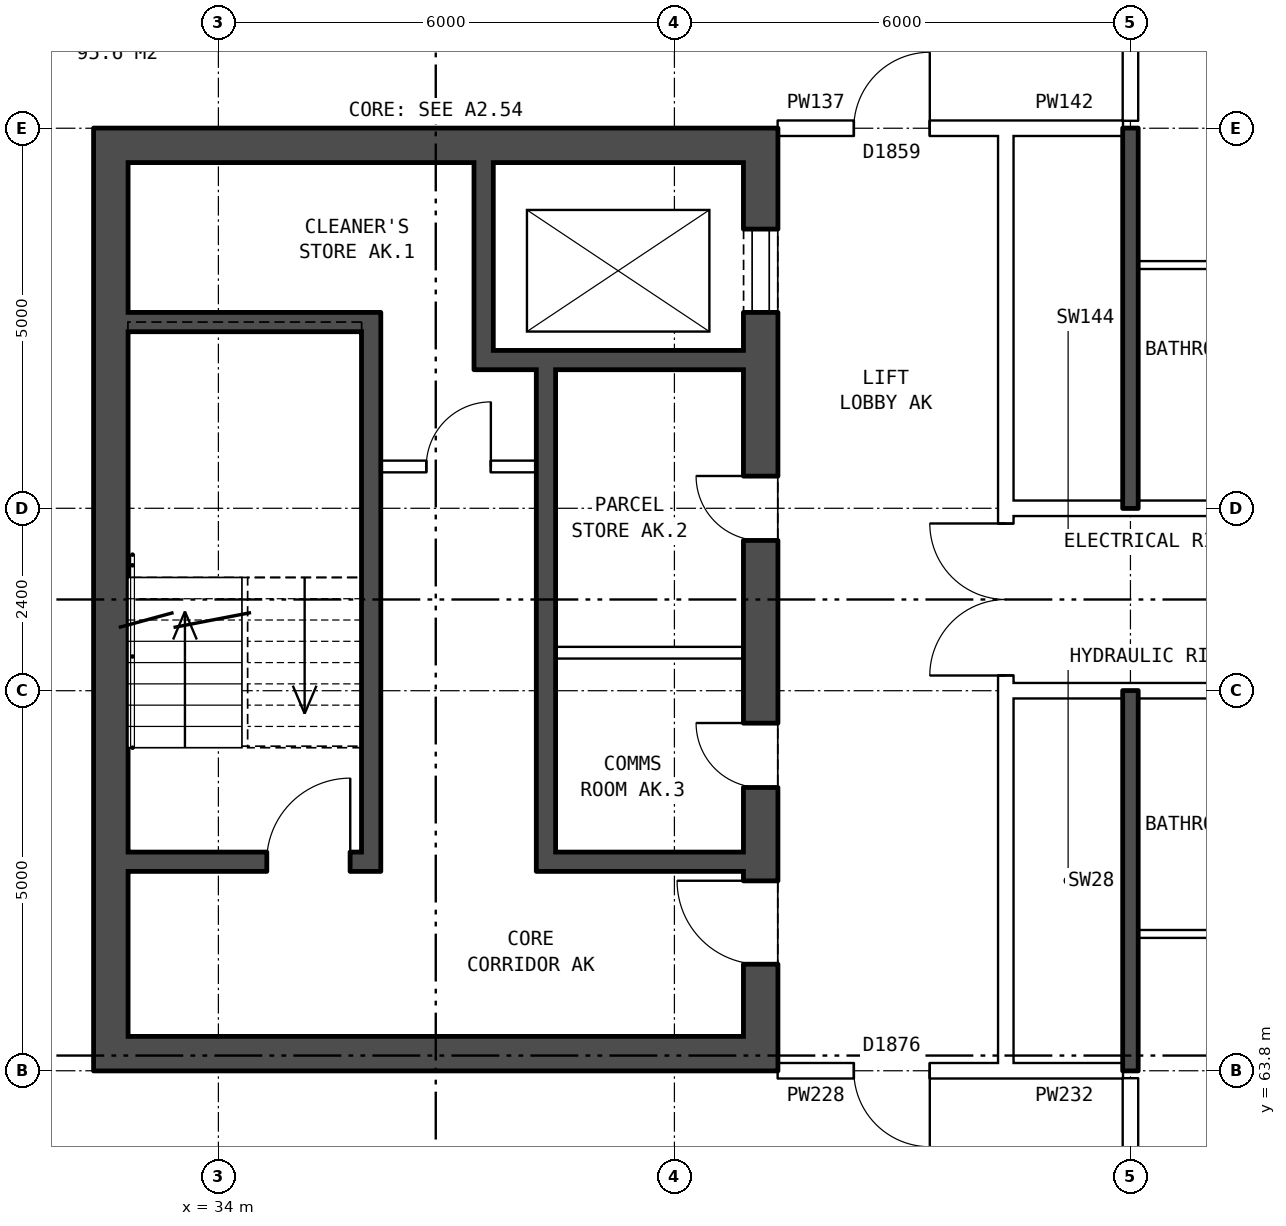
"""IFC4 building model, lengths in metres.
Left out: names, types, materials, properties, quantities, classifications, styles, units other than length and angle.
Written with IfcOpenShell. Run it as: python <this file> out.ifc"""

import sys

from ifc_helpers import new_model, si_unit, direction, frame, frame_2d, origin, place, context, subcontext, project, spatial, rectangle, extrude, element, fill, save


model = new_model("IFC4")
c1 = context("Model", 3, precision=1e-05, world=origin(), true_north=direction((0.0, 1.0)))
c2 = subcontext(c1, "Body", "Model", "MODEL_VIEW")
j1 = project(units=[si_unit("LENGTHUNIT", "METRE"), si_unit("PLANEANGLEUNIT", "RADIAN")], contexts=[c1])
p1 = place(None, origin())
s1 = spatial("IfcSite", under=j1, at=p1, CompositionType="ELEMENT")
p2 = place(p1, origin())
s2 = spatial("IfcBuilding", under=s1, at=p2, CompositionType="ELEMENT")
p3 = place(p2, frame((0.0, 0.0, 188.2)))
s3 = spatial("IfcBuildingStorey", under=s2, at=p3, CompositionType="ELEMENT", Elevation=188.2)
p4 = place(p3, frame((41.135, 76.2, 0.0), z_axis=(0.0, 0.0, 1.0), x_axis=(0.0, -1.0, 0.0)))
e1 = element("IfcWall", 1, at=p4, inside=s3, PredefinedType="SHEAR", context=c2, shape_type="SweptSolid", body=[
    extrude(rectangle(XDim=12.4, YDim=0.45, at=frame_2d((6.2, 0.0))), origin(), (0.0, 0.0, 1.0), 2.85),
])
p5 = place(p4, frame((1.325, 0.0, 0.0)))
e2 = element("IfcOpeningElement", 2, at=p5, cuts=e1, PredefinedType="OPENING", context=c2, shape_type="SweptSolid", body=[
    extrude(rectangle(XDim=1.1, YDim=2.1, at=frame_2d((0.55, 1.05))), frame((0.0, 0.235, 0.0), z_axis=(0.0, -1.0, 0.0), x_axis=(1.0, 0.0, 0.0)), (0.0, 0.0, 1.0), 0.47),
])
p6 = place(p4, frame((4.575, 0.0, 0.0)))
e3 = element("IfcOpeningElement", 3, at=p6, cuts=e1, PredefinedType="OPENING", context=c2, shape_type="SweptSolid", body=[
    extrude(rectangle(XDim=0.85, YDim=2.1, at=frame_2d((0.425, 1.05))), frame((0.0, 0.235, 0.0), z_axis=(0.0, -1.0, 0.0), x_axis=(1.0, 0.0, 0.0)), (0.0, 0.0, 1.0), 0.47),
])
p7 = place(p4, frame((7.825, 0.0, 0.0)))
e4 = element("IfcOpeningElement", 4, at=p7, cuts=e1, PredefinedType="OPENING", context=c2, shape_type="SweptSolid", body=[
    extrude(rectangle(XDim=0.85, YDim=2.1, at=frame_2d((0.425, 1.05))), frame((0.0, 0.235, 0.0), z_axis=(0.0, -1.0, 0.0), x_axis=(1.0, 0.0, 0.0)), (0.0, 0.0, 1.0), 0.47),
])
p8 = place(p4, frame((9.9, 0.0, 0.0)))
e5 = element("IfcOpeningElement", 5, at=p8, cuts=e1, PredefinedType="OPENING", context=c2, shape_type="SweptSolid", body=[
    extrude(rectangle(XDim=1.1, YDim=2.1, at=frame_2d((0.55, 1.05))), frame((0.0, 0.235, 0.0), z_axis=(0.0, -1.0, 0.0), x_axis=(1.0, 0.0, 0.0)), (0.0, 0.0, 1.0), 0.47),
])
p9 = place(p3, frame((32.585, 76.2, 0.0), z_axis=(0.0, 0.0, 1.0), x_axis=(0.0, -1.0, 0.0)))
e6 = element("IfcWall", 6, at=p9, inside=s3, PredefinedType="SHEAR", context=c2, shape_type="SweptSolid", body=[
    extrude(rectangle(XDim=12.4, YDim=0.45, at=frame_2d((6.2, 0.0))), origin(), (0.0, 0.0, 1.0), 2.85),
])
for number, where, z_axis, x_axis in (
    (7, (40.91, 75.975, 0.0), (0.0, 0.0, 1.0), (-1.0, 0.0, 0.0)),
    (8, (40.91, 64.025, 0.0), (0.0, 0.0, 1.0), (-1.0, 0.0, 0.0)),
):
    element("IfcWall", number, at=place(p3, frame(where, z_axis=z_axis, x_axis=x_axis)), inside=s3, PredefinedType="SHEAR", context=c2, shape_type="SweptSolid", body=[
        extrude(rectangle(XDim=8.1, YDim=0.45, at=frame_2d((4.05, 0.0))), origin(), (0.0, 0.0, 1.0), 2.85),
    ])
p10 = place(p3, frame((35.885, 73.65, 0.0), z_axis=(0.0, 0.0, 1.0), x_axis=(-1.0, 0.0, 0.0)))
e9 = element("IfcWall", 9, at=p10, inside=s3, PredefinedType="SHEAR", context=c2, shape_type="SweptSolid", body=[
    extrude(rectangle(XDim=3.075, YDim=0.25, at=frame_2d((1.538, 0.0))), origin(), (0.0, 0.0, 1.0), 2.85),
])
p11 = place(p3, frame((40.91, 73.15, 0.0), z_axis=(0.0, 0.0, 1.0), x_axis=(-1.0, 0.0, 0.0)))
e10 = element("IfcWall", 10, at=p11, inside=s3, PredefinedType="SHEAR", context=c2, shape_type="SweptSolid", body=[
    extrude(rectangle(XDim=3.545, YDim=0.25, at=frame_2d((1.772, 0.0))), origin(), (0.0, 0.0, 1.0), 2.85),
])
p12 = place(p3, frame((38.185, 71.75, 0.0), z_axis=(0.0, 0.0, 1.0), x_axis=(-1.0, 0.0, 0.0)))
e11 = element("IfcWall", 11, at=p12, inside=s3, PredefinedType="PARTITIONING", context=c2, shape_type="SweptSolid", body=[
    extrude(rectangle(XDim=2.05, YDim=0.15, at=frame_2d((1.025, 0.0))), origin(), (0.0, 0.0, 1.0), 2.85),
])
p13 = place(p12, frame((0.6, 0.0, 0.0)))
e12 = element("IfcOpeningElement", 12, at=p13, cuts=e11, PredefinedType="OPENING", context=c2, shape_type="SweptSolid", body=[
    extrude(rectangle(XDim=0.85, YDim=2.1, at=frame_2d((0.425, 1.05))), frame((0.0, 0.085, 0.0), z_axis=(0.0, -1.0, 0.0), x_axis=(1.0, 0.0, 0.0)), (0.0, 0.0, 1.0), 0.17),
])
p14 = place(p3, frame((40.91, 69.3, 0.0), z_axis=(0.0, 0.0, 1.0), x_axis=(-1.0, 0.0, 0.0)))
e13 = element("IfcWall", 13, at=p14, inside=s3, PredefinedType="PARTITIONING", context=c2, shape_type="SweptSolid", body=[
    extrude(rectangle(XDim=2.475, YDim=0.15, at=frame_2d((1.237, 0.0))), origin(), (0.0, 0.0, 1.0), 2.85),
])
p15 = place(p3, frame((40.91, 66.55, 0.0), z_axis=(0.0, 0.0, 1.0), x_axis=(-1.0, 0.0, 0.0)))
e14 = element("IfcWall", 14, at=p15, inside=s3, PredefinedType="SHEAR", context=c2, shape_type="SweptSolid", body=[
    extrude(rectangle(XDim=2.475, YDim=0.25, at=frame_2d((1.237, 0.0))), origin(), (0.0, 0.0, 1.0), 2.85),
])
p16 = place(p3, frame((35.885, 66.55, 0.0), z_axis=(0.0, 0.0, 1.0), x_axis=(-1.0, 0.0, 0.0)))
e15 = element("IfcWall", 15, at=p16, inside=s3, PredefinedType="SHEAR", context=c2, shape_type="SweptSolid", body=[
    extrude(rectangle(XDim=3.075, YDim=0.25, at=frame_2d((1.538, 0.0))), origin(), (0.0, 0.0, 1.0), 2.85),
])
p17 = place(p16, frame((0.15, 0.0, 0.0)))
e16 = element("IfcOpeningElement", 16, at=p17, cuts=e15, PredefinedType="OPENING", context=c2, shape_type="SweptSolid", body=[
    extrude(rectangle(XDim=1.1, YDim=2.1, at=frame_2d((0.55, 1.05))), frame((0.0, 0.135, 0.0), z_axis=(0.0, -1.0, 0.0), x_axis=(1.0, 0.0, 0.0)), (0.0, 0.0, 1.0), 0.27),
])
p18 = place(p3, frame((38.31, 73.025, 0.0), z_axis=(0.0, 0.0, 1.0), x_axis=(0.0, -1.0, 0.0)))
e17 = element("IfcWall", 17, at=p18, inside=s3, PredefinedType="SHEAR", context=c2, shape_type="SweptSolid", body=[
    extrude(rectangle(XDim=6.6, YDim=0.25, at=frame_2d((3.3, 0.0))), origin(), (0.0, 0.0, 1.0), 2.85),
])
p19 = place(p3, frame((37.49, 75.75, 0.0), z_axis=(0.0, 0.0, 1.0), x_axis=(0.0, -1.0, 0.0)))
e18 = element("IfcWall", 18, at=p19, inside=s3, PredefinedType="SHEAR", context=c2, shape_type="SweptSolid", body=[
    extrude(rectangle(XDim=2.475, YDim=0.25, at=frame_2d((1.238, 0.0))), origin(), (0.0, 0.0, 1.0), 2.85),
])
p20 = place(p3, frame((36.01, 73.775, 0.0), z_axis=(0.0, 0.0, 1.0), x_axis=(0.0, -1.0, 0.0)))
e19 = element("IfcWall", 19, at=p20, inside=s3, PredefinedType="SHEAR", context=c2, shape_type="SweptSolid", body=[
    extrude(rectangle(XDim=7.35, YDim=0.25, at=frame_2d((3.675, 0.0))), origin(), (0.0, 0.0, 1.0), 2.85),
])
p21 = place(p3, frame((44.36, 63.9, 0.0), z_axis=(0.0, 0.0, 1.0), x_axis=(0.0, 1.0, 0.0)))
e20 = element("IfcWall", 20, at=p21, inside=s3, PredefinedType="PARTITIONING", context=c2, shape_type="SweptSolid", body=[
    extrude(rectangle(XDim=12.2, YDim=0.2, at=frame_2d((6.1, 0.0))), origin(), (0.0, 0.0, 1.0), 2.85),
])
p22 = place(p21, frame((5.1, 0.0, 0.0)))
e21 = element("IfcOpeningElement", 21, at=p22, cuts=e20, PredefinedType="OPENING", context=c2, shape_type="SweptSolid", body=[
    extrude(rectangle(XDim=2.0, YDim=2.1, at=frame_2d((1.0, 1.05))), frame((0.0, 0.11, 0.0), z_axis=(0.0, -1.0, 0.0), x_axis=(1.0, 0.0, 0.0)), (0.0, 0.0, 1.0), 0.22),
])
p23 = place(p3, frame((41.36, 63.8, 0.0), z_axis=(0.0, 0.0, 1.0), x_axis=(1.0, 0.0, 0.0)))
e22 = element("IfcWall", 22, at=p23, inside=s3, PredefinedType="PARTITIONING", context=c2, shape_type="SweptSolid", body=[
    extrude(rectangle(XDim=3.0, YDim=0.2, at=frame_2d((1.5, 0.0))), origin(), (0.0, 0.0, 1.0), 2.85),
])
p24 = place(p23, frame((1.0, 0.0, 0.0)))
e23 = element("IfcOpeningElement", 23, at=p24, cuts=e22, PredefinedType="OPENING", context=c2, shape_type="SweptSolid", body=[
    extrude(rectangle(XDim=1.0, YDim=2.1, at=frame_2d((0.5, 1.05))), frame((0.0, 0.11, 0.0), z_axis=(0.0, -1.0, 0.0), x_axis=(1.0, 0.0, 0.0)), (0.0, 0.0, 1.0), 0.22),
])
p25 = place(p3, frame((44.36, 63.8, 0.0), z_axis=(0.0, 0.0, 1.0), x_axis=(1.0, 0.0, 0.0)))
e24 = element("IfcWall", 24, at=p25, inside=s3, PredefinedType="PARTITIONING", context=c2, shape_type="SweptSolid", body=[
    extrude(rectangle(XDim=1.54, YDim=0.2, at=frame_2d((0.77, 0.0))), origin(), (0.0, 0.0, 1.0), 2.85),
])
p26 = place(p3, frame((46.1, 65.6, 0.0), z_axis=(0.0, 0.0, 1.0), x_axis=(1.0, 0.0, 0.0)))
e25 = element("IfcWall", 25, at=p26, inside=s3, PredefinedType="PARTITIONING", context=c2, shape_type="SweptSolid", body=[
    extrude(rectangle(XDim=2.9, YDim=0.1, at=frame_2d((1.45, 0.0))), origin(), (0.0, 0.0, 1.0), 2.85),
])
p27 = place(p3, frame((44.36, 68.8, 0.0), z_axis=(0.0, 0.0, 1.0), x_axis=(1.0, 0.0, 0.0)))
e26 = element("IfcWall", 26, at=p27, inside=s3, PredefinedType="PARTITIONING", context=c2, shape_type="SweptSolid", body=[
    extrude(rectangle(XDim=19.28, YDim=0.2, at=frame_2d((9.64, 0.0))), origin(), (0.0, 0.0, 1.0), 2.85),
])
p28 = place(p27, frame((14.64, 0.0, 0.0)))
e27 = element("IfcOpeningElement", 27, at=p28, cuts=e26, PredefinedType="OPENING", context=c2, shape_type="SweptSolid", body=[
    extrude(rectangle(XDim=1.0, YDim=2.1, at=frame_2d((0.5, 1.05))), frame((0.0, 0.11, 0.0), z_axis=(0.0, -1.0, 0.0), x_axis=(1.0, 0.0, 0.0)), (0.0, 0.0, 1.0), 0.22),
])
p29 = place(p27, frame((5.64, 0.0, 0.0)))
e28 = element("IfcOpeningElement", 28, at=p29, cuts=e26, PredefinedType="OPENING", context=c2, shape_type="SweptSolid", body=[
    extrude(rectangle(XDim=1.0, YDim=2.1, at=frame_2d((0.5, 1.05))), frame((0.0, 0.11, 0.0), z_axis=(0.0, -1.0, 0.0), x_axis=(1.0, 0.0, 0.0)), (0.0, 0.0, 1.0), 0.22),
])
p30 = place(p3, frame((44.36, 71.2, 0.0), z_axis=(0.0, 0.0, 1.0), x_axis=(1.0, 0.0, 0.0)))
e29 = element("IfcWall", 29, at=p30, inside=s3, PredefinedType="PARTITIONING", context=c2, shape_type="SweptSolid", body=[
    extrude(rectangle(XDim=19.28, YDim=0.2, at=frame_2d((9.64, 0.0))), origin(), (0.0, 0.0, 1.0), 2.85),
])
p31 = place(p30, frame((14.64, 0.0, 0.0)))
e30 = element("IfcOpeningElement", 30, at=p31, cuts=e29, PredefinedType="OPENING", context=c2, shape_type="SweptSolid", body=[
    extrude(rectangle(XDim=1.0, YDim=2.1, at=frame_2d((0.5, 1.05))), frame((0.0, 0.11, 0.0), z_axis=(0.0, -1.0, 0.0), x_axis=(1.0, 0.0, 0.0)), (0.0, 0.0, 1.0), 0.22),
])
p32 = place(p30, frame((5.64, 0.0, 0.0)))
e31 = element("IfcOpeningElement", 31, at=p32, cuts=e29, PredefinedType="OPENING", context=c2, shape_type="SweptSolid", body=[
    extrude(rectangle(XDim=1.0, YDim=2.1, at=frame_2d((0.5, 1.05))), frame((0.0, 0.11, 0.0), z_axis=(0.0, -1.0, 0.0), x_axis=(1.0, 0.0, 0.0)), (0.0, 0.0, 1.0), 0.22),
])
p33 = place(p3, frame((46.1, 74.4, 0.0), z_axis=(0.0, 0.0, 1.0), x_axis=(1.0, 0.0, 0.0)))
e32 = element("IfcWall", 32, at=p33, inside=s3, PredefinedType="PARTITIONING", context=c2, shape_type="SweptSolid", body=[
    extrude(rectangle(XDim=2.9, YDim=0.1, at=frame_2d((1.45, 0.0))), origin(), (0.0, 0.0, 1.0), 2.85),
])
p34 = place(p3, frame((41.36, 76.2, 0.0), z_axis=(0.0, 0.0, 1.0), x_axis=(1.0, 0.0, 0.0)))
e33 = element("IfcWall", 33, at=p34, inside=s3, PredefinedType="PARTITIONING", context=c2, shape_type="SweptSolid", body=[
    extrude(rectangle(XDim=3.0, YDim=0.2, at=frame_2d((1.5, 0.0))), origin(), (0.0, 0.0, 1.0), 2.85),
])
p35 = place(p34, frame((1.0, 0.0, 0.0)))
e34 = element("IfcOpeningElement", 34, at=p35, cuts=e33, PredefinedType="OPENING", context=c2, shape_type="SweptSolid", body=[
    extrude(rectangle(XDim=1.0, YDim=2.1, at=frame_2d((0.5, 1.05))), frame((0.0, 0.11, 0.0), z_axis=(0.0, -1.0, 0.0), x_axis=(1.0, 0.0, 0.0)), (0.0, 0.0, 1.0), 0.22),
])
p36 = place(p3, frame((44.36, 76.2, 0.0), z_axis=(0.0, 0.0, 1.0), x_axis=(1.0, 0.0, 0.0)))
e35 = element("IfcWall", 35, at=p36, inside=s3, PredefinedType="PARTITIONING", context=c2, shape_type="SweptSolid", body=[
    extrude(rectangle(XDim=1.54, YDim=0.2, at=frame_2d((0.77, 0.0))), origin(), (0.0, 0.0, 1.0), 2.85),
])
p37 = place(p3, frame((46.0, 61.5, 0.0), z_axis=(0.0, 0.0, 1.0), x_axis=(0.0, 1.0, 0.0)))
e36 = element("IfcWall", 36, at=p37, inside=s3, PredefinedType="PARTITIONING", context=c2, shape_type="SweptSolid", body=[
    extrude(rectangle(XDim=2.2, YDim=0.2, at=frame_2d((1.1, 0.0))), origin(), (0.0, 0.0, 1.0), 2.85),
])
for number, where, z_axis, x_axis in (
    (37, (46.0, 63.8, 0.0), (0.0, 0.0, 1.0), (0.0, 1.0, 0.0)),
    (38, (46.0, 71.2, 0.0), (0.0, 0.0, 1.0), (0.0, 1.0, 0.0)),
):
    element("IfcWall", number, at=place(p3, frame(where, z_axis=z_axis, x_axis=x_axis)), inside=s3, PredefinedType="SOLIDWALL", context=c2, shape_type="SweptSolid", body=[
        extrude(rectangle(XDim=5.0, YDim=0.2, at=frame_2d((2.5, 0.0))), origin(), (0.0, 0.0, 1.0), 2.85),
    ])
p38 = place(p3, frame((46.0, 76.3, 0.0), z_axis=(0.0, 0.0, 1.0), x_axis=(0.0, 1.0, 0.0)))
e39 = element("IfcWall", 39, at=p38, inside=s3, PredefinedType="PARTITIONING", context=c2, shape_type="SweptSolid", body=[
    extrude(rectangle(XDim=2.2, YDim=0.2, at=frame_2d((1.1, 0.0))), origin(), (0.0, 0.0, 1.0), 2.85),
])
p39 = place(p5, origin())
e40 = element("IfcDoor", 40, at=p39, inside=s3, OperationType="DOUBLE_DOOR_SLIDING", PredefinedType="DOOR", context=c2, shape_type="SweptSolid", body=[
    extrude(rectangle(XDim=1.1, YDim=2.1, at=frame_2d((0.55, 1.05))), frame((0.0, -0.16, 0.0), z_axis=(0.0, -1.0, 0.0), x_axis=(1.0, 0.0, 0.0)), (0.0, 0.0, 1.0), 0.05),
])
fill(e2, e40)
p40 = place(p6, frame((0.85, 0.0, 0.0), z_axis=(0.0, 0.0, 1.0), x_axis=(-1.0, 0.0, 0.0)))
e41 = element("IfcDoor", 41, at=p40, inside=s3, OperationType="SINGLE_SWING_RIGHT", PredefinedType="DOOR", context=c2, shape_type="SweptSolid", body=[
    extrude(rectangle(XDim=0.85, YDim=2.1, at=frame_2d((0.425, 1.05))), frame((0.0, 0.21, 0.0), z_axis=(0.0, -1.0, 0.0), x_axis=(1.0, 0.0, 0.0)), (0.0, 0.0, 1.0), 0.05),
])
fill(e3, e41)
p41 = place(p7, frame((0.85, 0.0, 0.0), z_axis=(0.0, 0.0, 1.0), x_axis=(-1.0, 0.0, 0.0)))
e42 = element("IfcDoor", 42, at=p41, inside=s3, OperationType="SINGLE_SWING_RIGHT", PredefinedType="DOOR", context=c2, shape_type="SweptSolid", body=[
    extrude(rectangle(XDim=0.85, YDim=2.1, at=frame_2d((0.425, 1.05))), frame((0.0, 0.21, 0.0), z_axis=(0.0, -1.0, 0.0), x_axis=(1.0, 0.0, 0.0)), (0.0, 0.0, 1.0), 0.05),
])
fill(e4, e42)
p42 = place(p8, frame((1.1, 0.0, 0.0), z_axis=(0.0, 0.0, 1.0), x_axis=(-1.0, 0.0, 0.0)))
e43 = element("IfcDoor", 43, at=p42, inside=s3, OperationType="SINGLE_SWING_RIGHT", PredefinedType="DOOR", context=c2, shape_type="SweptSolid", body=[
    extrude(rectangle(XDim=1.1, YDim=2.1, at=frame_2d((0.55, 1.05))), frame((0.0, 0.21, 0.0), z_axis=(0.0, -1.0, 0.0), x_axis=(1.0, 0.0, 0.0)), (0.0, 0.0, 1.0), 0.05),
])
fill(e5, e43)
p43 = place(p17, frame((1.1, 0.0, 0.0), z_axis=(0.0, 0.0, 1.0), x_axis=(-1.0, 0.0, 0.0)))
e44 = element("IfcDoor", 44, at=p43, inside=s3, OperationType="SINGLE_SWING_RIGHT", PredefinedType="DOOR", context=c2, shape_type="SweptSolid", body=[
    extrude(rectangle(XDim=1.1, YDim=2.1, at=frame_2d((0.55, 1.05))), frame((0.0, 0.025, 0.0), z_axis=(0.0, -1.0, 0.0), x_axis=(1.0, 0.0, 0.0)), (0.0, 0.0, 1.0), 0.05),
])
fill(e16, e44)
p44 = place(p13, frame((0.85, 0.0, 0.0), z_axis=(0.0, 0.0, 1.0), x_axis=(-1.0, 0.0, 0.0)))
e45 = element("IfcDoor", 45, at=p44, inside=s3, OperationType="SINGLE_SWING_RIGHT", PredefinedType="DOOR", context=c2, shape_type="SweptSolid", body=[
    extrude(rectangle(XDim=0.85, YDim=2.1, at=frame_2d((0.425, 1.05))), frame((0.0, 0.025, 0.0), z_axis=(0.0, -1.0, 0.0), x_axis=(1.0, 0.0, 0.0)), (0.0, 0.0, 1.0), 0.05),
])
fill(e12, e45)
p45 = place(p22, origin())
e46 = element("IfcDoor", 46, at=p45, inside=s3, OperationType="DOUBLE_DOOR_SINGLE_SWING", PredefinedType="DOOR", context=c2, shape_type="SweptSolid", body=[
    extrude(rectangle(XDim=2.0, YDim=2.1, at=frame_2d((1.0, 1.05))), frame((0.0, 0.025, 0.0), z_axis=(0.0, -1.0, 0.0), x_axis=(1.0, 0.0, 0.0)), (0.0, 0.0, 1.0), 0.05),
])
fill(e21, e46)
p46 = place(p24, frame((1.0, 0.0, 0.0), z_axis=(0.0, 0.0, 1.0), x_axis=(-1.0, 0.0, 0.0)))
e47 = element("IfcDoor", 47, at=p46, inside=s3, OperationType="SINGLE_SWING_LEFT", PredefinedType="DOOR", context=c2, shape_type="SweptSolid", body=[
    extrude(rectangle(XDim=1.0, YDim=2.1, at=frame_2d((0.5, 1.05))), frame((0.0, 0.025, 0.0), z_axis=(0.0, -1.0, 0.0), x_axis=(1.0, 0.0, 0.0)), (0.0, 0.0, 1.0), 0.05),
])
fill(e23, e47)
p47 = place(p35, origin())
e48 = element("IfcDoor", 48, at=p47, inside=s3, OperationType="SINGLE_SWING_RIGHT", PredefinedType="DOOR", context=c2, shape_type="SweptSolid", body=[
    extrude(rectangle(XDim=1.0, YDim=2.1, at=frame_2d((0.5, 1.05))), frame((0.0, 0.025, 0.0), z_axis=(0.0, -1.0, 0.0), x_axis=(1.0, 0.0, 0.0)), (0.0, 0.0, 1.0), 0.05),
])
fill(e34, e48)
save(model, sys.argv[1])
